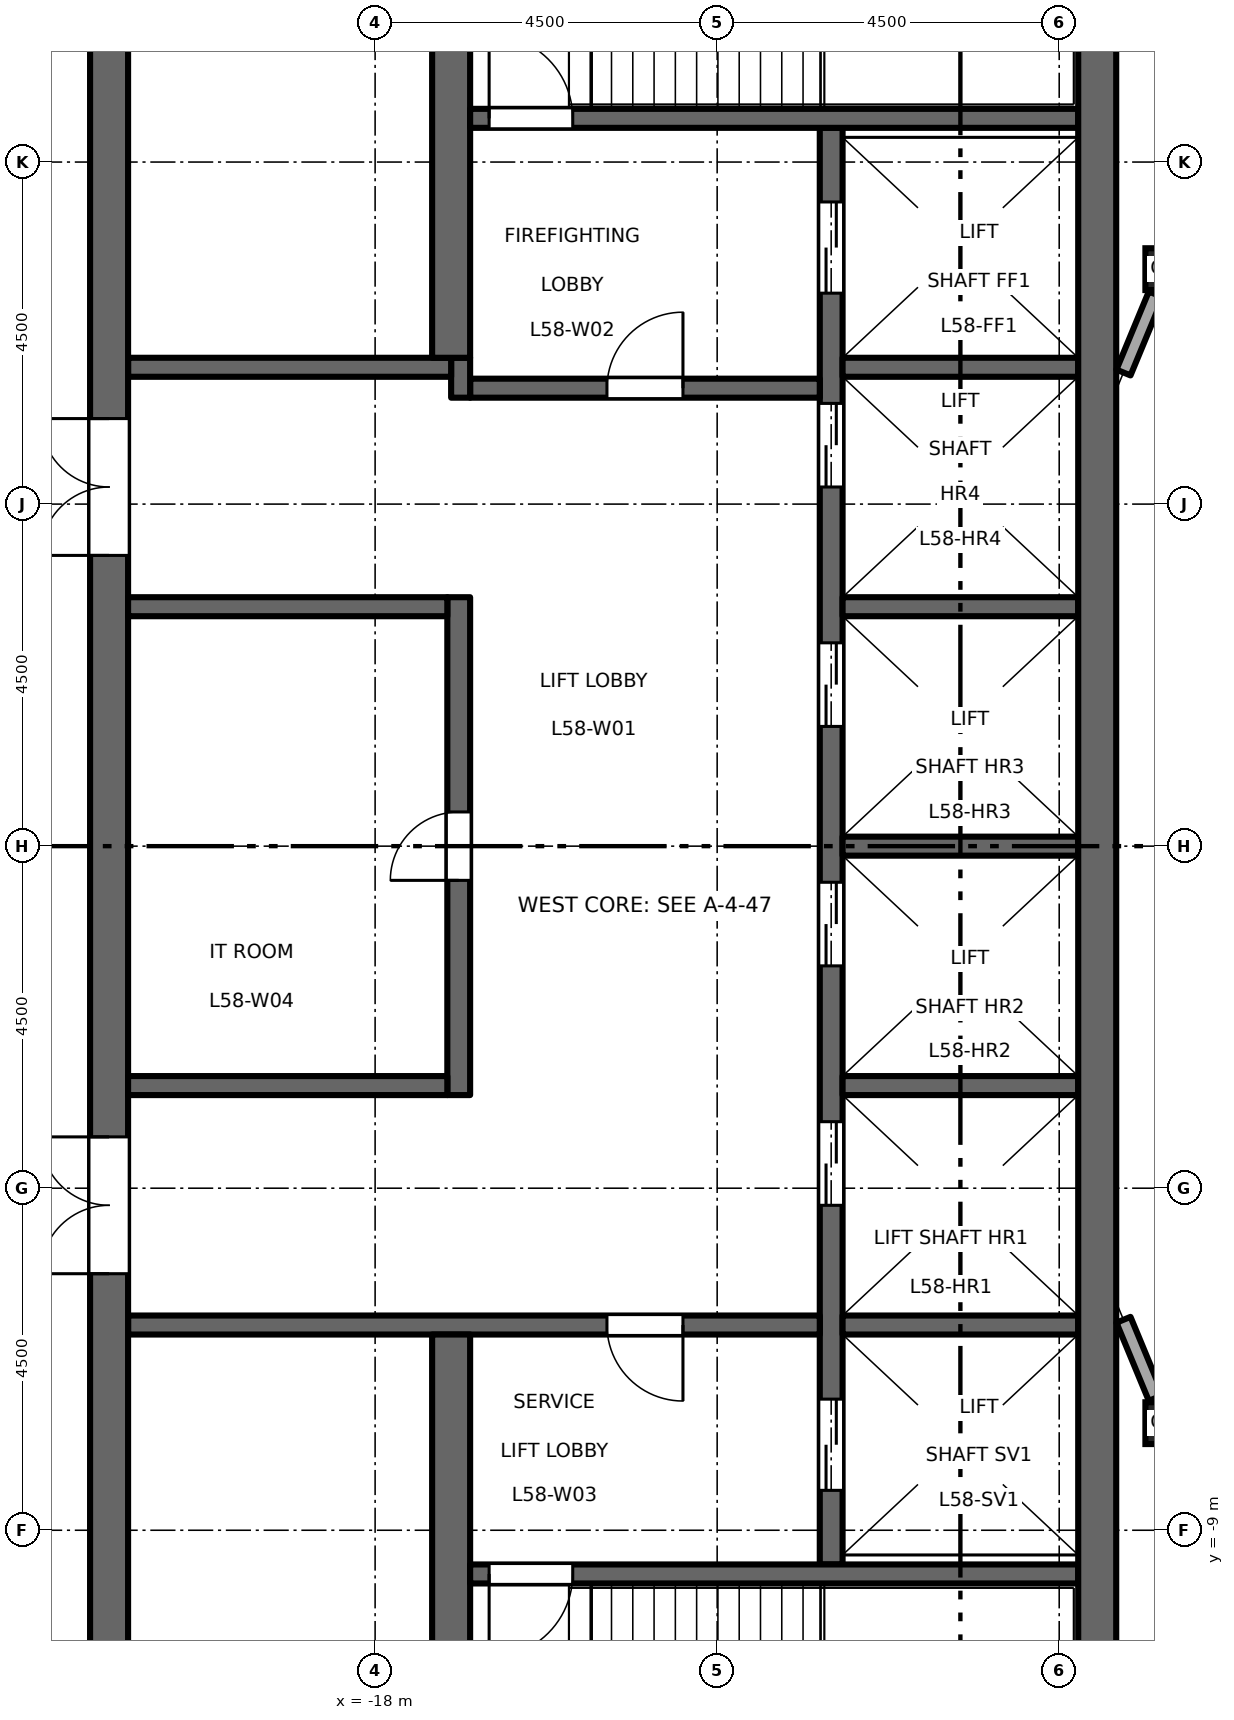
"""IFC4 building model, lengths in metres.
Left out: names, types, materials, properties, quantities, classifications, styles, units other than length and angle.
Written with IfcOpenShell. Run it as: python <this file> out.ifc"""

import sys

from ifc_helpers import new_model, si_unit, direction, frame, frame_2d, origin, origin_2d, place, context, subcontext, project, spatial, rectangle, hollow_rectangle, extrude, element, fill, save


model = new_model("IFC4")
c1 = context("Model", 3, precision=1e-05, world=origin(), true_north=direction((0.0, 1.0)))
c2 = subcontext(c1, "Body", "Model", "MODEL_VIEW")
j1 = project(units=[si_unit("LENGTHUNIT", "METRE"), si_unit("PLANEANGLEUNIT", "RADIAN")], contexts=[c1])
p1 = place(None, origin())
s1 = spatial("IfcSite", under=j1, at=p1, CompositionType="ELEMENT")
p2 = place(p1, origin())
s2 = spatial("IfcBuilding", under=s1, at=p2, CompositionType="ELEMENT")
p3 = place(p2, frame((0.0, 0.0, 269.2)))
s3 = spatial("IfcBuildingStorey", under=s2, at=p3, CompositionType="ELEMENT", Elevation=269.2)
for number, where, z_axis, x_axis in (
    (1, (-7.591, -7.591, 0.0), (0.0, 0.0, 1.0), (1.0, 0.0, 0.0)),
    (2, (-7.591, 7.591, 0.0), (0.0, 0.0, 1.0), (1.0, 0.0, 0.0)),
):
    element("IfcColumn", number, at=place(p3, frame(where, z_axis=z_axis, x_axis=x_axis)), inside=s3, PredefinedType="COLUMN", context=c2, shape_type="SweptSolid", body=[
        extrude(hollow_rectangle(XDim=0.55, YDim=0.55, WallThickness=0.028, at=origin_2d()), origin(), (0.0, 0.0, 1.0), 4.5),
    ])
p4 = place(p3, frame((-12.0, -9.45, 0.0), z_axis=(0.0, 0.0, 1.0), x_axis=(0.0, 1.0, 0.0)))
e3 = element("IfcWall", 3, at=p4, inside=s3, PredefinedType="SHEAR", context=c2, shape_type="SweptSolid", body=[
    extrude(rectangle(XDim=18.9, YDim=0.3, at=frame_2d((9.45, 0.0))), origin(), (0.0, 0.0, 1.0), 4.35),
])
p5 = place(p4, frame((4.725, 0.0, 0.0)))
e4 = element("IfcOpeningElement", 4, at=p5, cuts=e3, PredefinedType="OPENING", context=c2, shape_type="SweptSolid", body=[
    extrude(rectangle(XDim=1.1, YDim=2.1, at=frame_2d((0.55, 1.05))), frame((0.0, 0.16, 0.0), z_axis=(0.0, -1.0, 0.0), x_axis=(1.0, 0.0, 0.0)), (0.0, 0.0, 1.0), 0.32),
])
p6 = place(p4, frame((7.875, 0.0, 0.0)))
e5 = element("IfcOpeningElement", 5, at=p6, cuts=e3, PredefinedType="OPENING", context=c2, shape_type="SweptSolid", body=[
    extrude(rectangle(XDim=1.1, YDim=2.1, at=frame_2d((0.55, 1.05))), frame((0.0, 0.16, 0.0), z_axis=(0.0, -1.0, 0.0), x_axis=(1.0, 0.0, 0.0)), (0.0, 0.0, 1.0), 0.32),
])
p7 = place(p4, frame((11.025, 0.0, 0.0)))
e6 = element("IfcOpeningElement", 6, at=p7, cuts=e3, PredefinedType="OPENING", context=c2, shape_type="SweptSolid", body=[
    extrude(rectangle(XDim=1.1, YDim=2.1, at=frame_2d((0.55, 1.05))), frame((0.0, 0.16, 0.0), z_axis=(0.0, -1.0, 0.0), x_axis=(1.0, 0.0, 0.0)), (0.0, 0.0, 1.0), 0.32),
])
p8 = place(p4, frame((14.175, 0.0, 0.0)))
e7 = element("IfcOpeningElement", 7, at=p8, cuts=e3, PredefinedType="OPENING", context=c2, shape_type="SweptSolid", body=[
    extrude(rectangle(XDim=1.1, YDim=2.1, at=frame_2d((0.55, 1.05))), frame((0.0, 0.16, 0.0), z_axis=(0.0, -1.0, 0.0), x_axis=(1.0, 0.0, 0.0)), (0.0, 0.0, 1.0), 0.32),
])
p9 = place(p4, frame((16.725, 0.0, 0.0)))
e8 = element("IfcOpeningElement", 8, at=p9, cuts=e3, PredefinedType="OPENING", context=c2, shape_type="SweptSolid", body=[
    extrude(rectangle(XDim=1.2, YDim=2.1, at=frame_2d((0.6, 1.05))), frame((0.0, 0.16, 0.0), z_axis=(0.0, -1.0, 0.0), x_axis=(1.0, 0.0, 0.0)), (0.0, 0.0, 1.0), 0.32),
])
p10 = place(p4, frame((0.975, 0.0, 0.0)))
e9 = element("IfcOpeningElement", 9, at=p10, cuts=e3, PredefinedType="OPENING", context=c2, shape_type="SweptSolid", body=[
    extrude(rectangle(XDim=1.2, YDim=2.1, at=frame_2d((0.6, 1.05))), frame((0.0, 0.16, 0.0), z_axis=(0.0, -1.0, 0.0), x_axis=(1.0, 0.0, 0.0)), (0.0, 0.0, 1.0), 0.32),
])
p11 = place(p3, frame((-12.15, 6.025, 0.0), z_axis=(0.0, 0.0, 1.0), x_axis=(-1.0, 0.0, 0.0)))
e10 = element("IfcWall", 10, at=p11, inside=s3, PredefinedType="SHEAR", context=c2, shape_type="SweptSolid", body=[
    extrude(rectangle(XDim=4.6, YDim=0.25, at=frame_2d((2.3, 0.0))), origin(), (0.0, 0.0, 1.0), 4.35),
])
p12 = place(p11, frame((1.8, 0.0, 0.0)))
e11 = element("IfcOpeningElement", 11, at=p12, cuts=e10, PredefinedType="OPENING", context=c2, shape_type="SweptSolid", body=[
    extrude(rectangle(XDim=1.0, YDim=2.1, at=frame_2d((0.5, 1.05))), frame((0.0, 0.135, 0.0), z_axis=(0.0, -1.0, 0.0), x_axis=(1.0, 0.0, 0.0)), (0.0, 0.0, 1.0), 0.27),
])
p13 = place(p3, frame((-16.875, 5.9, 0.0), z_axis=(0.0, 0.0, 1.0), x_axis=(0.0, 1.0, 0.0)))
e12 = element("IfcWall", 12, at=p13, inside=s3, PredefinedType="SHEAR", context=c2, shape_type="SweptSolid", body=[
    extrude(rectangle(XDim=0.525, YDim=0.25, at=frame_2d((0.263, 0.0))), origin(), (0.0, 0.0, 1.0), 4.35),
])
p14 = place(p3, frame((-17.0, 6.3, 0.0), z_axis=(0.0, 0.0, 1.0), x_axis=(-1.0, 0.0, 0.0)))
e13 = element("IfcWall", 13, at=p14, inside=s3, PredefinedType="SHEAR", context=c2, shape_type="SweptSolid", body=[
    extrude(rectangle(XDim=4.25, YDim=0.25, at=frame_2d((2.125, 0.0))), origin(), (0.0, 0.0, 1.0), 4.35),
])
p15 = place(p3, frame((-12.15, -6.3, 0.0), z_axis=(0.0, 0.0, 1.0), x_axis=(-1.0, 0.0, 0.0)))
e14 = element("IfcWall", 14, at=p15, inside=s3, PredefinedType="SHEAR", context=c2, shape_type="SweptSolid", body=[
    extrude(rectangle(XDim=9.1, YDim=0.25, at=frame_2d((4.55, 0.0))), origin(), (0.0, 0.0, 1.0), 4.35),
])
p16 = place(p15, frame((1.8, 0.0, 0.0)))
e15 = element("IfcOpeningElement", 15, at=p16, cuts=e14, PredefinedType="OPENING", context=c2, shape_type="SweptSolid", body=[
    extrude(rectangle(XDim=1.0, YDim=2.1, at=frame_2d((0.5, 1.05))), frame((0.0, 0.135, 0.0), z_axis=(0.0, -1.0, 0.0), x_axis=(1.0, 0.0, 0.0)), (0.0, 0.0, 1.0), 0.27),
])
p17 = place(p3, frame((-21.5, -13.0, 0.0), z_axis=(0.0, 0.0, 1.0), x_axis=(0.0, 1.0, 0.0)))
e16 = element("IfcWall", 16, at=p17, inside=s3, PredefinedType="SHEAR", context=c2, shape_type="SweptSolid", body=[
    extrude(rectangle(XDim=26.0, YDim=0.5, at=frame_2d((13.0, 0.0))), origin(), (0.0, 0.0, 1.0), 4.35),
])
p18 = place(p17, frame((16.825, 0.0, 0.0)))
e17 = element("IfcOpeningElement", 17, at=p18, cuts=e16, PredefinedType="OPENING", context=c2, shape_type="SweptSolid", body=[
    extrude(rectangle(XDim=1.8, YDim=2.1, at=frame_2d((0.9, 1.05))), frame((0.0, 0.26, 0.0), z_axis=(0.0, -1.0, 0.0), x_axis=(1.0, 0.0, 0.0)), (0.0, 0.0, 1.0), 0.52),
])
p19 = place(p17, frame((7.375, 0.0, 0.0)))
e18 = element("IfcOpeningElement", 18, at=p19, cuts=e16, PredefinedType="OPENING", context=c2, shape_type="SweptSolid", body=[
    extrude(rectangle(XDim=1.8, YDim=2.1, at=frame_2d((0.9, 1.05))), frame((0.0, 0.26, 0.0), z_axis=(0.0, -1.0, 0.0), x_axis=(1.0, 0.0, 0.0)), (0.0, 0.0, 1.0), 0.52),
])
p20 = place(p3, frame((-16.9, -3.275, 0.0), z_axis=(0.0, 0.0, 1.0), x_axis=(0.0, 1.0, 0.0)))
e19 = element("IfcWall", 19, at=p20, inside=s3, PredefinedType="SHEAR", context=c2, shape_type="SweptSolid", body=[
    extrude(rectangle(XDim=6.55, YDim=0.3, at=frame_2d((3.275, 0.0))), origin(), (0.0, 0.0, 1.0), 4.35),
])
p21 = place(p20, frame((2.825, 0.0, 0.0)))
e20 = element("IfcOpeningElement", 20, at=p21, cuts=e19, PredefinedType="OPENING", context=c2, shape_type="SweptSolid", body=[
    extrude(rectangle(XDim=0.9, YDim=2.1, at=frame_2d((0.45, 1.05))), frame((0.0, 0.16, 0.0), z_axis=(0.0, -1.0, 0.0), x_axis=(1.0, 0.0, 0.0)), (0.0, 0.0, 1.0), 0.32),
])
for number, where, z_axis, x_axis in (
    (21, (-17.05, 3.15, 0.0), (0.0, 0.0, 1.0), (-1.0, 0.0, 0.0)),
    (22, (-17.05, -3.15, 0.0), (0.0, 0.0, 1.0), (-1.0, 0.0, 0.0)),
):
    element("IfcWall", number, at=place(p3, frame(where, z_axis=z_axis, x_axis=x_axis)), inside=s3, PredefinedType="SHEAR", context=c2, shape_type="SweptSolid", body=[
        extrude(rectangle(XDim=4.2, YDim=0.25, at=frame_2d((2.1, 0.0))), origin(), (0.0, 0.0, 1.0), 4.35),
    ])
for number, where, z_axis, x_axis in (
    (23, (-17.0, 6.425, 0.0), (0.0, 0.0, 1.0), (0.0, 1.0, 0.0)),
    (24, (-17.0, -13.0, 0.0), (0.0, 0.0, 1.0), (0.0, 1.0, 0.0)),
):
    element("IfcWall", number, at=place(p3, frame(where, z_axis=z_axis, x_axis=x_axis)), inside=s3, PredefinedType="SHEAR", context=c2, shape_type="SweptSolid", body=[
        extrude(rectangle(XDim=6.575, YDim=0.5, at=frame_2d((3.288, 0.0))), origin(), (0.0, 0.0, 1.0), 4.35),
    ])
for number, where, z_axis, x_axis in (
    (25, (-8.75, 0.0, 0.0), (0.0, 0.0, 1.0), (-1.0, 0.0, 0.0)),
    (26, (-8.75, 3.15, 0.0), (0.0, 0.0, 1.0), (-1.0, 0.0, 0.0)),
    (27, (-8.75, 6.3, 0.0), (0.0, 0.0, 1.0), (-1.0, 0.0, 0.0)),
    (28, (-8.75, -3.15, 0.0), (0.0, 0.0, 1.0), (-1.0, 0.0, 0.0)),
    (29, (-8.75, -6.3, 0.0), (0.0, 0.0, 1.0), (-1.0, 0.0, 0.0)),
):
    element("IfcWall", number, at=place(p3, frame(where, z_axis=z_axis, x_axis=x_axis)), inside=s3, PredefinedType="SHEAR", context=c2, shape_type="SweptSolid", body=[
        extrude(rectangle(XDim=3.1, YDim=0.25, at=frame_2d((1.55, 0.0))), origin(), (0.0, 0.0, 1.0), 4.35),
    ])
p22 = place(p3, frame((-8.75, 9.575, 0.0), z_axis=(0.0, 0.0, 1.0), x_axis=(-1.0, 0.0, 0.0)))
e30 = element("IfcWall", 30, at=p22, inside=s3, PredefinedType="SHEAR", context=c2, shape_type="SweptSolid", body=[
    extrude(rectangle(XDim=8.0, YDim=0.25, at=frame_2d((4.0, 0.0))), origin(), (0.0, 0.0, 1.0), 4.35),
])
p23 = place(p22, frame((6.65, 0.0, 0.0)))
e31 = element("IfcOpeningElement", 31, at=p23, cuts=e30, PredefinedType="OPENING", context=c2, shape_type="SweptSolid", body=[
    extrude(rectangle(XDim=1.1, YDim=2.1, at=frame_2d((0.55, 1.05))), frame((0.0, 0.135, 0.0), z_axis=(0.0, -1.0, 0.0), x_axis=(1.0, 0.0, 0.0)), (0.0, 0.0, 1.0), 0.27),
])
p24 = place(p3, frame((-8.75, -9.575, 0.0), z_axis=(0.0, 0.0, 1.0), x_axis=(-1.0, 0.0, 0.0)))
e32 = element("IfcWall", 32, at=p24, inside=s3, PredefinedType="SHEAR", context=c2, shape_type="SweptSolid", body=[
    extrude(rectangle(XDim=8.0, YDim=0.25, at=frame_2d((4.0, 0.0))), origin(), (0.0, 0.0, 1.0), 4.35),
])
p25 = place(p24, frame((6.65, 0.0, 0.0)))
e33 = element("IfcOpeningElement", 33, at=p25, cuts=e32, PredefinedType="OPENING", context=c2, shape_type="SweptSolid", body=[
    extrude(rectangle(XDim=1.1, YDim=2.1, at=frame_2d((0.55, 1.05))), frame((0.0, 0.135, 0.0), z_axis=(0.0, -1.0, 0.0), x_axis=(1.0, 0.0, 0.0)), (0.0, 0.0, 1.0), 0.27),
])
p26 = place(p3, frame((-8.5, -13.0, 0.0), z_axis=(0.0, 0.0, 1.0), x_axis=(0.0, 1.0, 0.0)))
e34 = element("IfcWall", 34, at=p26, inside=s3, PredefinedType="SHEAR", context=c2, shape_type="SweptSolid", body=[
    extrude(rectangle(XDim=26.0, YDim=0.5, at=frame_2d((13.0, 0.0))), origin(), (0.0, 0.0, 1.0), 4.35),
])
for number, where, z_axis, x_axis in (
    (35, (-7.729, 7.259, 0.0), (0.0, 0.0, 1.0), (-0.383, -0.924, 0.0)),
    (36, (-8.154, -6.231, 0.0), (0.0, 0.0, 1.0), (0.383, -0.924, 0.0)),
):
    element("IfcWall", number, at=place(p3, frame(where, z_axis=z_axis, x_axis=x_axis)), inside=s3, PredefinedType="STANDARD", context=c2, shape_type="SweptSolid", body=[
        extrude(rectangle(XDim=1.113, YDim=0.2, at=frame_2d((0.556, 0.0))), origin(), (0.0, 0.0, 1.0), 3.918),
    ])
p27 = place(p12, origin())
e37 = element("IfcDoor", 37, at=p27, inside=s3, OperationType="SINGLE_SWING_LEFT", PredefinedType="DOOR", context=c2, shape_type="SweptSolid", body=[
    extrude(rectangle(XDim=1.0, YDim=2.1, at=frame_2d((0.5, 1.05))), frame((0.0, 0.025, 0.0), z_axis=(0.0, -1.0, 0.0), x_axis=(1.0, 0.0, 0.0)), (0.0, 0.0, 1.0), 0.05),
])
fill(e11, e37)
p28 = place(p16, origin())
e38 = element("IfcDoor", 38, at=p28, inside=s3, OperationType="SINGLE_SWING_RIGHT", PredefinedType="DOOR", context=c2, shape_type="SweptSolid", body=[
    extrude(rectangle(XDim=1.0, YDim=2.1, at=frame_2d((0.5, 1.05))), frame((0.0, 0.025, 0.0), z_axis=(0.0, -1.0, 0.0), x_axis=(1.0, 0.0, 0.0)), (0.0, 0.0, 1.0), 0.05),
])
fill(e15, e38)
p29 = place(p23, origin())
e39 = element("IfcDoor", 39, at=p29, inside=s3, OperationType="SINGLE_SWING_RIGHT", PredefinedType="DOOR", context=c2, shape_type="SweptSolid", body=[
    extrude(rectangle(XDim=1.1, YDim=2.1, at=frame_2d((0.55, 1.05))), frame((0.0, 0.025, 0.0), z_axis=(0.0, -1.0, 0.0), x_axis=(1.0, 0.0, 0.0)), (0.0, 0.0, 1.0), 0.05),
])
fill(e31, e39)
p30 = place(p25, origin())
e40 = element("IfcDoor", 40, at=p30, inside=s3, OperationType="SINGLE_SWING_LEFT", PredefinedType="DOOR", context=c2, shape_type="SweptSolid", body=[
    extrude(rectangle(XDim=1.1, YDim=2.1, at=frame_2d((0.55, 1.05))), frame((0.0, 0.025, 0.0), z_axis=(0.0, -1.0, 0.0), x_axis=(1.0, 0.0, 0.0)), (0.0, 0.0, 1.0), 0.05),
])
fill(e33, e40)
p31 = place(p18, origin())
e41 = element("IfcDoor", 41, at=p31, inside=s3, OperationType="DOUBLE_DOOR_DOUBLE_SWING", PredefinedType="DOOR", context=c2, shape_type="SweptSolid", body=[
    extrude(rectangle(XDim=1.8, YDim=2.1, at=frame_2d((0.9, 1.05))), frame((0.0, 0.025, 0.0), z_axis=(0.0, -1.0, 0.0), x_axis=(1.0, 0.0, 0.0)), (0.0, 0.0, 1.0), 0.05),
])
fill(e17, e41)
p32 = place(p19, origin())
e42 = element("IfcDoor", 42, at=p32, inside=s3, OperationType="DOUBLE_DOOR_DOUBLE_SWING", PredefinedType="DOOR", context=c2, shape_type="SweptSolid", body=[
    extrude(rectangle(XDim=1.8, YDim=2.1, at=frame_2d((0.9, 1.05))), frame((0.0, 0.025, 0.0), z_axis=(0.0, -1.0, 0.0), x_axis=(1.0, 0.0, 0.0)), (0.0, 0.0, 1.0), 0.05),
])
fill(e18, e42)
p33 = place(p5, origin())
e43 = element("IfcDoor", 43, at=p33, inside=s3, OperationType="DOUBLE_DOOR_SLIDING", PredefinedType="DOOR", context=c2, shape_type="SweptSolid", body=[
    extrude(rectangle(XDim=1.1, YDim=2.1, at=frame_2d((0.55, 1.05))), frame((0.0, 0.025, 0.0), z_axis=(0.0, -1.0, 0.0), x_axis=(1.0, 0.0, 0.0)), (0.0, 0.0, 1.0), 0.05),
])
fill(e4, e43)
p34 = place(p6, origin())
e44 = element("IfcDoor", 44, at=p34, inside=s3, OperationType="DOUBLE_DOOR_SLIDING", PredefinedType="DOOR", context=c2, shape_type="SweptSolid", body=[
    extrude(rectangle(XDim=1.1, YDim=2.1, at=frame_2d((0.55, 1.05))), frame((0.0, 0.025, 0.0), z_axis=(0.0, -1.0, 0.0), x_axis=(1.0, 0.0, 0.0)), (0.0, 0.0, 1.0), 0.05),
])
fill(e5, e44)
p35 = place(p7, origin())
e45 = element("IfcDoor", 45, at=p35, inside=s3, OperationType="DOUBLE_DOOR_SLIDING", PredefinedType="DOOR", context=c2, shape_type="SweptSolid", body=[
    extrude(rectangle(XDim=1.1, YDim=2.1, at=frame_2d((0.55, 1.05))), frame((0.0, 0.025, 0.0), z_axis=(0.0, -1.0, 0.0), x_axis=(1.0, 0.0, 0.0)), (0.0, 0.0, 1.0), 0.05),
])
fill(e6, e45)
p36 = place(p8, origin())
e46 = element("IfcDoor", 46, at=p36, inside=s3, OperationType="DOUBLE_DOOR_SLIDING", PredefinedType="DOOR", context=c2, shape_type="SweptSolid", body=[
    extrude(rectangle(XDim=1.1, YDim=2.1, at=frame_2d((0.55, 1.05))), frame((0.0, 0.025, 0.0), z_axis=(0.0, -1.0, 0.0), x_axis=(1.0, 0.0, 0.0)), (0.0, 0.0, 1.0), 0.05),
])
fill(e7, e46)
p37 = place(p9, origin())
e47 = element("IfcDoor", 47, at=p37, inside=s3, OperationType="DOUBLE_DOOR_SLIDING", PredefinedType="DOOR", context=c2, shape_type="SweptSolid", body=[
    extrude(rectangle(XDim=1.2, YDim=2.1, at=frame_2d((0.6, 1.05))), frame((0.0, 0.025, 0.0), z_axis=(0.0, -1.0, 0.0), x_axis=(1.0, 0.0, 0.0)), (0.0, 0.0, 1.0), 0.05),
])
fill(e8, e47)
p38 = place(p10, origin())
e48 = element("IfcDoor", 48, at=p38, inside=s3, OperationType="DOUBLE_DOOR_SLIDING", PredefinedType="DOOR", context=c2, shape_type="SweptSolid", body=[
    extrude(rectangle(XDim=1.2, YDim=2.1, at=frame_2d((0.6, 1.05))), frame((0.0, 0.025, 0.0), z_axis=(0.0, -1.0, 0.0), x_axis=(1.0, 0.0, 0.0)), (0.0, 0.0, 1.0), 0.05),
])
fill(e9, e48)
p39 = place(p21, origin())
e49 = element("IfcDoor", 49, at=p39, inside=s3, OperationType="SINGLE_SWING_RIGHT", PredefinedType="DOOR", context=c2, shape_type="SweptSolid", body=[
    extrude(rectangle(XDim=0.9, YDim=2.1, at=frame_2d((0.45, 1.05))), frame((0.0, 0.025, 0.0), z_axis=(0.0, -1.0, 0.0), x_axis=(1.0, 0.0, 0.0)), (0.0, 0.0, 1.0), 0.05),
])
fill(e20, e49)
save(model, sys.argv[1])
